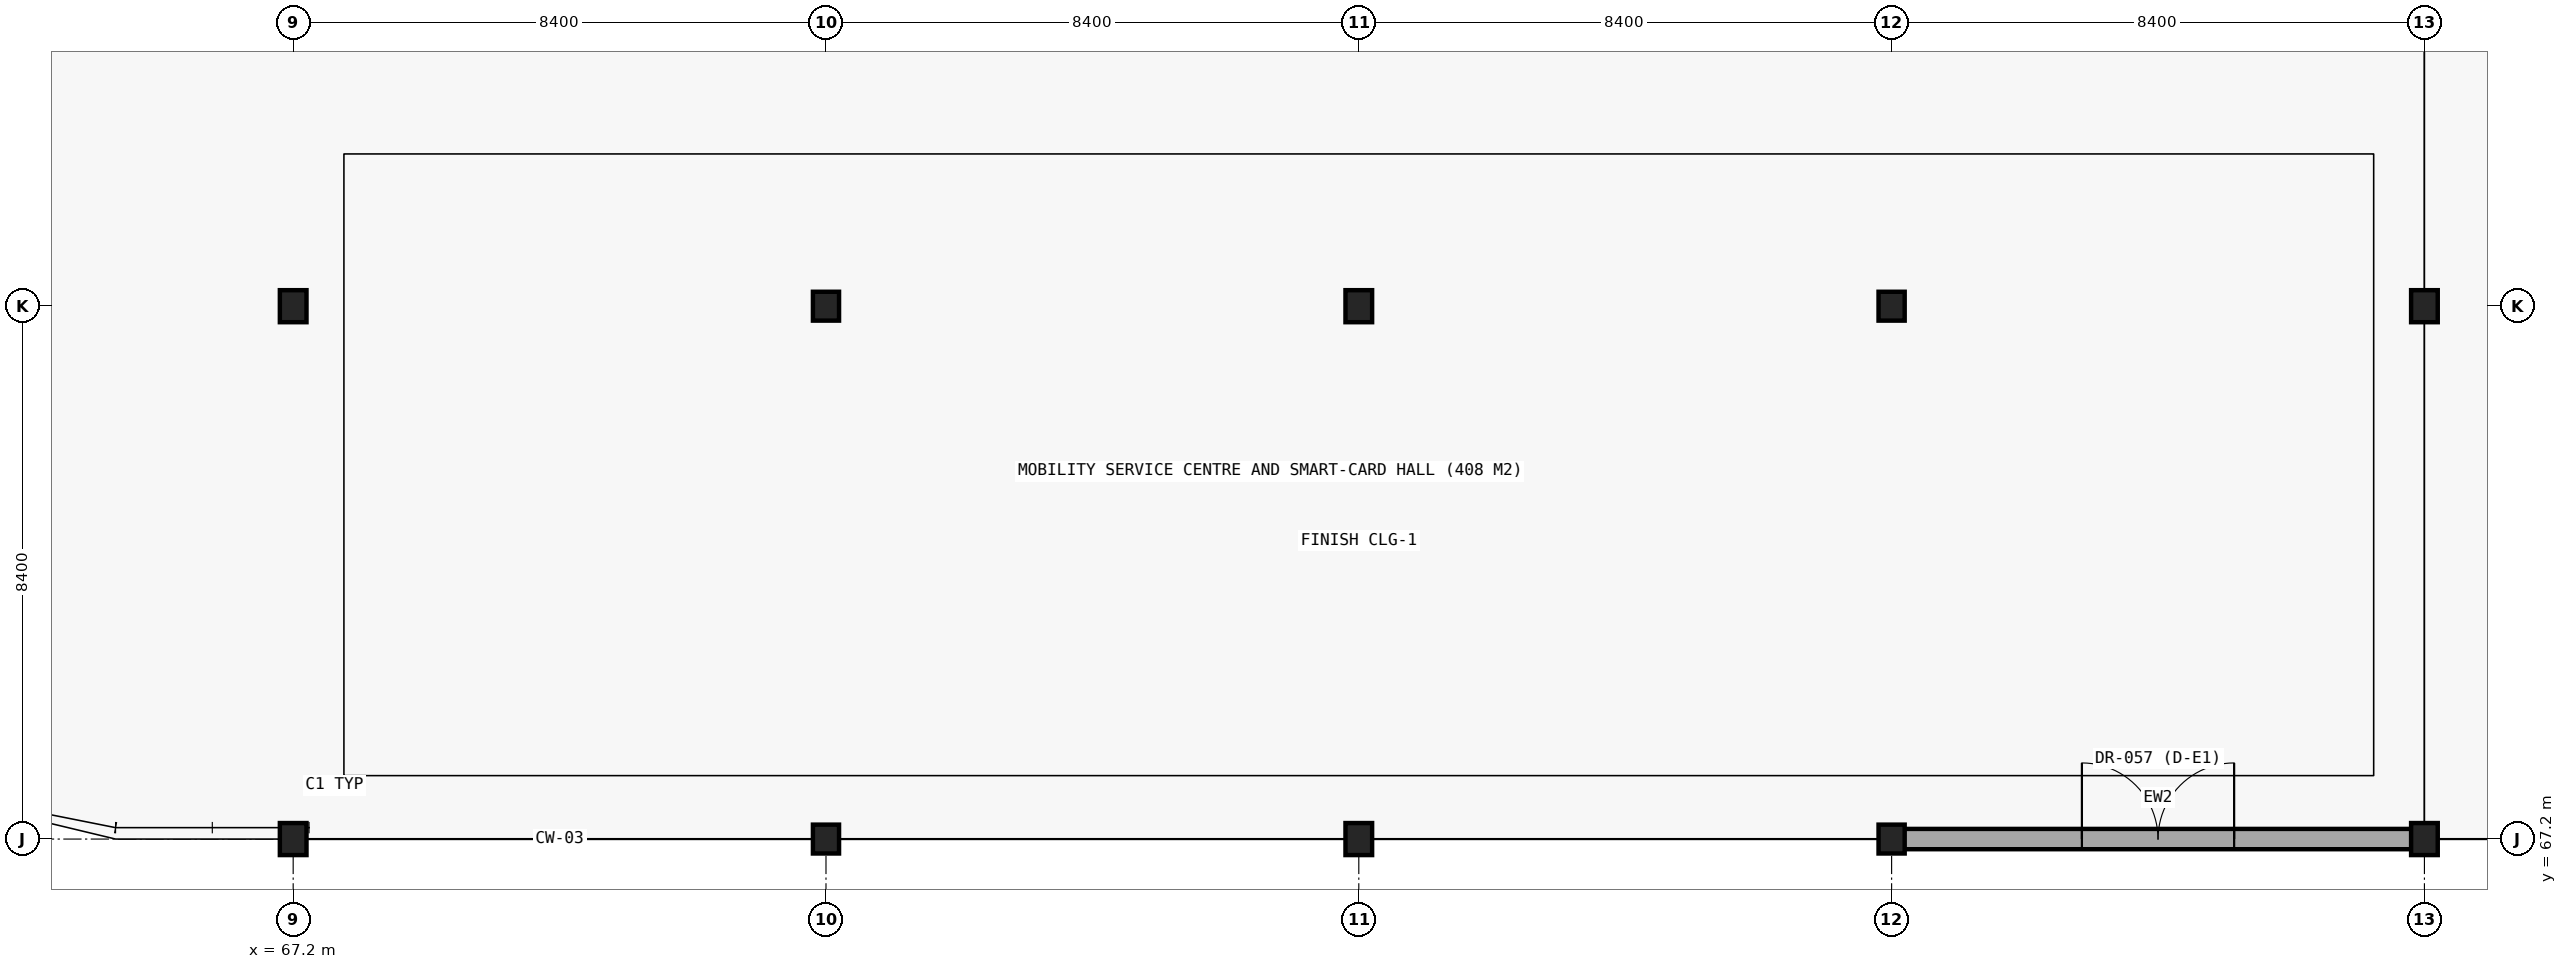
"""IFC4 building model, lengths in metres.
Left out: names, types, materials, properties, quantities, classifications, styles, units other than length and angle.
Written with IfcOpenShell. Run it as: python <this file> out.ifc"""

import sys

from ifc_helpers import new_model, si_unit, direction, frame, frame_2d, origin, origin_2d, place, context, subcontext, project, spatial, rectangle, i_section, extrude, element, fill, save


model = new_model("IFC4")
c1 = context("Model", 3, precision=1e-05, world=origin(), true_north=direction((0.0, 1.0)))
c2 = subcontext(c1, "Body", "Model", "MODEL_VIEW")
j1 = project(units=[si_unit("LENGTHUNIT", "METRE"), si_unit("PLANEANGLEUNIT", "RADIAN")], contexts=[c1])
p1 = place(None, origin())
s1 = spatial("IfcSite", under=j1, at=p1, CompositionType="ELEMENT")
p2 = place(p1, origin())
s2 = spatial("IfcBuilding", under=s1, at=p2, CompositionType="ELEMENT")
p3 = place(p2, origin())
s3 = spatial("IfcBuildingStorey", under=s2, at=p3, CompositionType="ELEMENT", Elevation=0.0)
for number, where, z_axis, x_axis in (
    (1, (67.2, 67.2, 0.0), (0.0, 0.0, 1.0), (1.0, 0.0, 0.0)),
    (2, (67.2, 75.6, 0.0), (0.0, 0.0, 1.0), (1.0, 0.0, 0.0)),
):
    element("IfcColumn", number, at=place(p3, frame(where, z_axis=z_axis, x_axis=x_axis)), inside=s3, PredefinedType="COLUMN", context=c2, shape_type="SweptSolid", body=[
        extrude(i_section(OverallWidth=0.42, OverallDepth=0.505, WebThickness=0.037, FlangeThickness=0.059, FilletRadius=0.015, at=origin_2d()), origin(), (0.0, 0.0, 1.0), 4.8),
    ])
for number, where, z_axis, x_axis in (
    (3, (75.6, 67.2, 0.0), (0.0, 0.0, 1.0), (1.0, 0.0, 0.0)),
    (4, (75.6, 75.6, 0.0), (0.0, 0.0, 1.0), (1.0, 0.0, 0.0)),
):
    element("IfcColumn", number, at=place(p3, frame(where, z_axis=z_axis, x_axis=x_axis)), inside=s3, PredefinedType="COLUMN", context=c2, shape_type="SweptSolid", body=[
        extrude(i_section(OverallWidth=0.412, OverallDepth=0.455, WebThickness=0.031, FlangeThickness=0.049, FilletRadius=0.015, at=origin_2d()), origin(), (0.0, 0.0, 1.0), 4.8),
    ])
for number, where, z_axis, x_axis in (
    (5, (84.0, 67.2, 0.0), (0.0, 0.0, 1.0), (1.0, 0.0, 0.0)),
    (6, (84.0, 75.6, 0.0), (0.0, 0.0, 1.0), (1.0, 0.0, 0.0)),
):
    element("IfcColumn", number, at=place(p3, frame(where, z_axis=z_axis, x_axis=x_axis)), inside=s3, PredefinedType="COLUMN", context=c2, shape_type="SweptSolid", body=[
        extrude(i_section(OverallWidth=0.42, OverallDepth=0.505, WebThickness=0.037, FlangeThickness=0.059, FilletRadius=0.015, at=origin_2d()), origin(), (0.0, 0.0, 1.0), 4.8),
    ])
for number, where, z_axis, x_axis in (
    (7, (92.4, 67.2, 0.0), (0.0, 0.0, 1.0), (1.0, 0.0, 0.0)),
    (8, (92.4, 75.6, 0.0), (0.0, 0.0, 1.0), (1.0, 0.0, 0.0)),
):
    element("IfcColumn", number, at=place(p3, frame(where, z_axis=z_axis, x_axis=x_axis)), inside=s3, PredefinedType="COLUMN", context=c2, shape_type="SweptSolid", body=[
        extrude(i_section(OverallWidth=0.412, OverallDepth=0.455, WebThickness=0.031, FlangeThickness=0.049, FilletRadius=0.015, at=origin_2d()), origin(), (0.0, 0.0, 1.0), 4.8),
    ])
for number, where, z_axis, x_axis in (
    (9, (100.8, 67.2, 0.0), (0.0, 0.0, 1.0), (1.0, 0.0, 0.0)),
    (10, (100.8, 75.6, 0.0), (0.0, 0.0, 1.0), (1.0, 0.0, 0.0)),
):
    element("IfcColumn", number, at=place(p3, frame(where, z_axis=z_axis, x_axis=x_axis)), inside=s3, PredefinedType="COLUMN", context=c2, shape_type="SweptSolid", body=[
        extrude(i_section(OverallWidth=0.42, OverallDepth=0.505, WebThickness=0.037, FlangeThickness=0.059, FilletRadius=0.015, at=origin_2d()), origin(), (0.0, 0.0, 1.0), 4.8),
    ])
p4 = place(p3, frame((92.4, 67.2, 0.0), z_axis=(0.0, 0.0, 1.0), x_axis=(1.0, 0.0, 0.0)))
e11 = element("IfcWall", 11, at=p4, inside=s3, PredefinedType="STANDARD", context=c2, shape_type="SweptSolid", body=[
    extrude(rectangle(XDim=8.4, YDim=0.32, at=frame_2d((4.2, 0.0))), origin(), (0.0, 0.0, 1.0), 4.2),
])
p5 = place(p4, frame((3.0, 0.0, 0.0)))
e12 = element("IfcOpeningElement", 12, at=p5, cuts=e11, PredefinedType="OPENING", context=c2, shape_type="SweptSolid", body=[
    extrude(rectangle(XDim=2.4, YDim=2.6, at=frame_2d((1.2, 1.3))), frame((0.0, 0.17, 0.0), z_axis=(0.0, -1.0, 0.0), x_axis=(1.0, 0.0, 0.0)), (0.0, 0.0, 1.0), 0.34),
])
p6 = place(p5, origin())
e13 = element("IfcDoor", 13, at=p6, inside=s3, OperationType="DOUBLE_DOOR_SINGLE_SWING", PredefinedType="DOOR", context=c2, shape_type="SweptSolid", body=[
    extrude(rectangle(XDim=2.4, YDim=2.6, at=frame_2d((1.2, 1.3))), frame((0.0, 0.025, 0.0), z_axis=(0.0, -1.0, 0.0), x_axis=(1.0, 0.0, 0.0)), (0.0, 0.0, 1.0), 0.05),
])
fill(e12, e13)
save(model, sys.argv[1])
